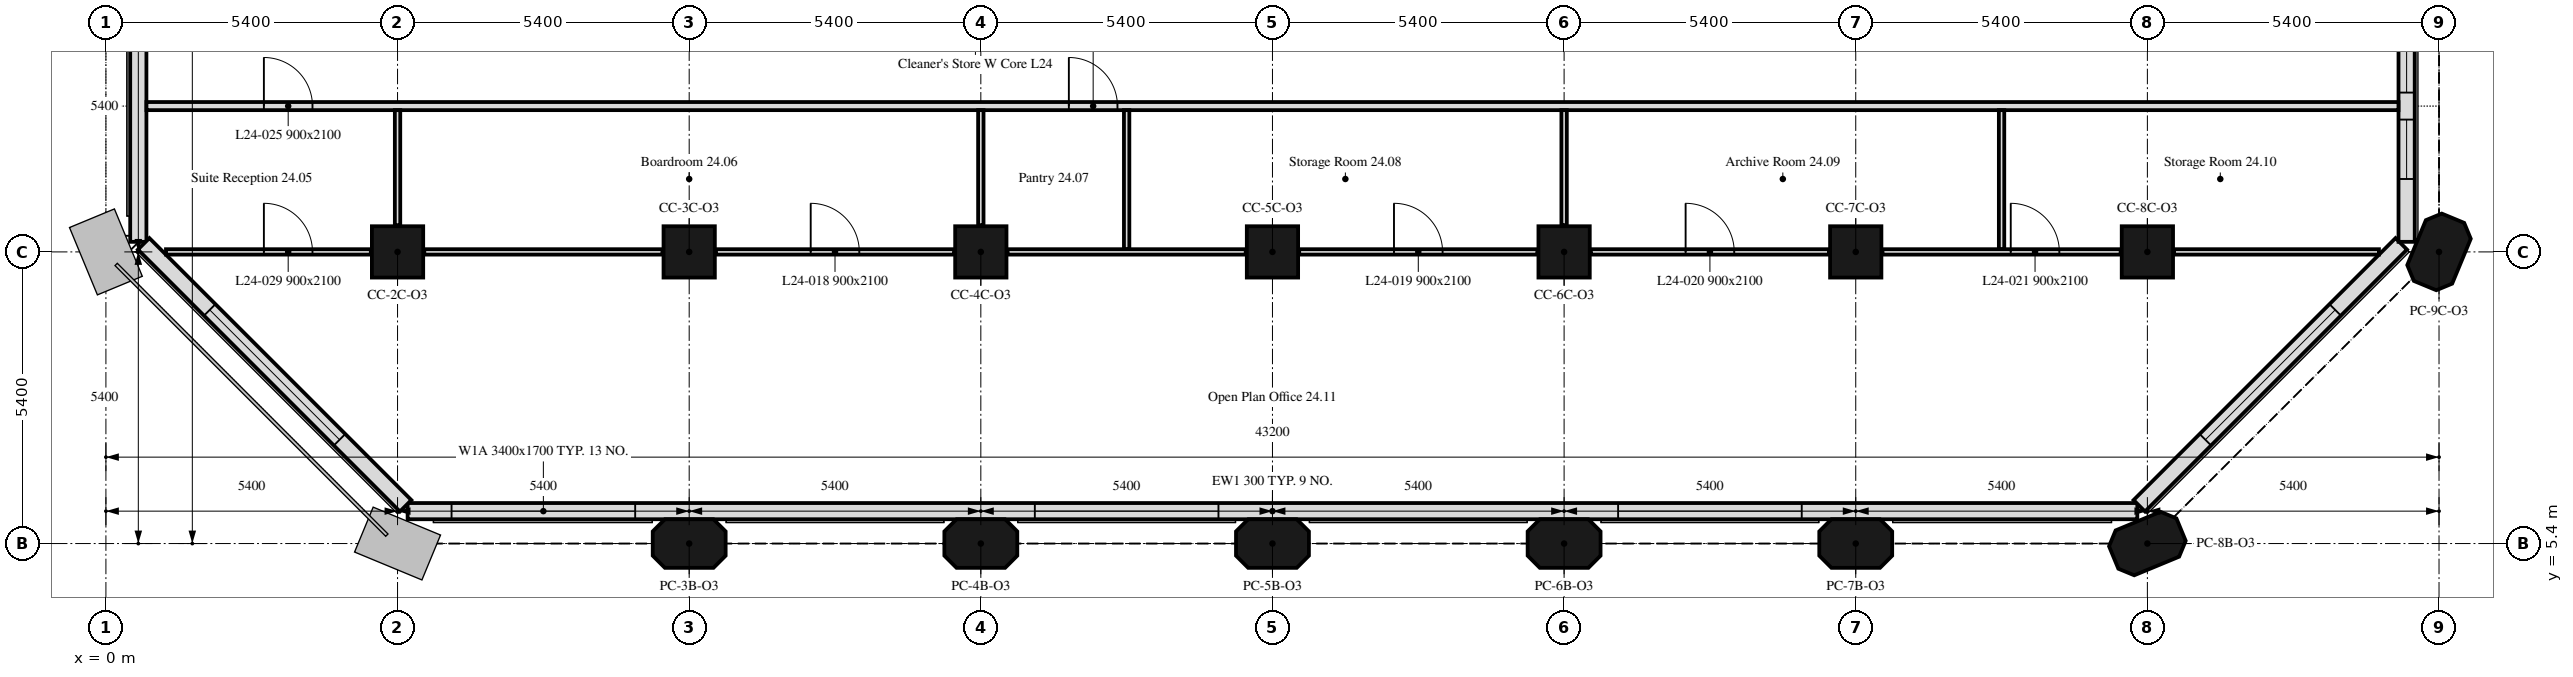
"""IFC4 building model, lengths in metres.
Left out: names, types, materials, properties, quantities, classifications, styles, units other than length and angle.
Written with IfcOpenShell. Run it as: python <this file> out.ifc"""

import sys

from ifc_helpers import new_model, si_unit, direction, frame, frame_2d, origin, origin_2d, place, context, subcontext, project, spatial, polyline, rectangle, outline, extrude, element, fill, save


model = new_model("IFC4")
c1 = context("Model", 3, precision=1e-05, world=origin(), true_north=direction((0.0, 1.0)))
c2 = subcontext(c1, "Body", "Model", "MODEL_VIEW")
j1 = project(units=[si_unit("LENGTHUNIT", "METRE"), si_unit("PLANEANGLEUNIT", "RADIAN")], contexts=[c1])
p1 = place(None, origin())
s1 = spatial("IfcSite", under=j1, at=p1, CompositionType="ELEMENT")
p2 = place(p1, origin())
s2 = spatial("IfcBuilding", under=s1, at=p2, CompositionType="ELEMENT")
p3 = place(p2, frame((0.0, 0.0, 103.0)))
s3 = spatial("IfcBuildingStorey", under=s2, at=p3, CompositionType="ELEMENT", Elevation=103.0)
for number, where, z_axis, x_axis in (
    (1, (10.8, 5.4, 0.0), (0.0, 0.0, 1.0), (1.0, 0.0, 0.0)),
    (2, (16.2, 5.4, 0.0), (0.0, 0.0, 1.0), (1.0, 0.0, 0.0)),
    (3, (21.6, 5.4, 0.0), (0.0, 0.0, 1.0), (1.0, 0.0, 0.0)),
    (4, (27.0, 5.4, 0.0), (0.0, 0.0, 1.0), (1.0, 0.0, 0.0)),
    (5, (32.4, 5.4, 0.0), (0.0, 0.0, 1.0), (1.0, 0.0, 0.0)),
    (6, (37.8, 5.4, 0.0), (0.0, 0.0, 1.0), (0.924, 0.383, 0.0)),
):
    element("IfcColumn", number, at=place(p3, frame(where, z_axis=z_axis, x_axis=x_axis)), inside=s3, PredefinedType="COLUMN", context=c2, shape_type="SweptSolid", body=[
        extrude(outline(polyline([(-0.45, -0.45), (0.45, -0.45), (0.675, -0.225), (0.675, 0.225), (0.45, 0.45), (-0.45, 0.45), (-0.675, 0.225), (-0.675, -0.225), (-0.45, -0.45)])), origin(), (0.0, 0.0, 1.0), 3.5),
    ])
for number, where, z_axis, x_axis in (
    (7, (5.4, 10.8, 0.0), (0.0, 0.0, 1.0), (1.0, 0.0, 0.0)),
    (8, (10.8, 10.8, 0.0), (0.0, 0.0, 1.0), (1.0, 0.0, 0.0)),
    (9, (16.2, 10.8, 0.0), (0.0, 0.0, 1.0), (1.0, 0.0, 0.0)),
    (10, (21.6, 10.8, 0.0), (0.0, 0.0, 1.0), (1.0, 0.0, 0.0)),
    (11, (27.0, 10.8, 0.0), (0.0, 0.0, 1.0), (1.0, 0.0, 0.0)),
    (12, (32.4, 10.8, 0.0), (0.0, 0.0, 1.0), (1.0, 0.0, 0.0)),
    (13, (37.8, 10.8, 0.0), (0.0, 0.0, 1.0), (1.0, 0.0, 0.0)),
):
    element("IfcColumn", number, at=place(p3, frame(where, z_axis=z_axis, x_axis=x_axis)), inside=s3, PredefinedType="COLUMN", context=c2, shape_type="SweptSolid", body=[
        extrude(rectangle(XDim=0.95, YDim=0.95, at=origin_2d()), origin(), (0.0, 0.0, 1.0), 3.5),
    ])
p4 = place(p3, frame((43.2, 10.8, 0.0), z_axis=(0.0, 0.0, 1.0), x_axis=(0.382683432365, 0.923879532511, 0.0)))
e14 = element("IfcColumn", 14, at=p4, inside=s3, PredefinedType="COLUMN", context=c2, shape_type="SweptSolid", body=[
    extrude(outline(polyline([(-0.45, -0.45), (0.45, -0.45), (0.675, -0.225), (0.675, 0.225), (0.45, 0.45), (-0.45, 0.45), (-0.675, 0.225), (-0.675, -0.225), (-0.45, -0.45)])), origin(), (0.0, 0.0, 1.0), 3.5),
])
p5 = place(p3, frame((5.586, 6.0, 0.0), z_axis=(0.0, 0.0, 1.0), x_axis=(1.0, 0.0, 0.0)))
e15 = element("IfcWall", 15, at=p5, inside=s3, PredefinedType="SOLIDWALL", context=c2, shape_type="SweptSolid", body=[
    extrude(rectangle(XDim=32.027, YDim=0.3, at=frame_2d((16.014, 0.0))), origin(), (0.0, 0.0, 1.0), 3.5),
])
p6 = place(p5, frame((0.814, 0.0, 0.9)))
e16 = element("IfcOpeningElement", 16, at=p6, cuts=e15, PredefinedType="OPENING", context=c2, shape_type="SweptSolid", body=[
    extrude(rectangle(XDim=3.4, YDim=1.7, at=frame_2d((1.7, 0.85))), frame((0.0, 0.16, 0.0), z_axis=(0.0, -1.0, 0.0), x_axis=(1.0, 0.0, 0.0)), (0.0, 0.0, 1.0), 0.32),
])
p7 = place(p5, frame((11.614, 0.0, 0.9)))
e17 = element("IfcOpeningElement", 17, at=p7, cuts=e15, PredefinedType="OPENING", context=c2, shape_type="SweptSolid", body=[
    extrude(rectangle(XDim=3.4, YDim=1.7, at=frame_2d((1.7, 0.85))), frame((0.0, 0.16, 0.0), z_axis=(0.0, -1.0, 0.0), x_axis=(1.0, 0.0, 0.0)), (0.0, 0.0, 1.0), 0.32),
])
p8 = place(p5, frame((22.414, 0.0, 0.9)))
e18 = element("IfcOpeningElement", 18, at=p8, cuts=e15, PredefinedType="OPENING", context=c2, shape_type="SweptSolid", body=[
    extrude(rectangle(XDim=3.4, YDim=1.7, at=frame_2d((1.7, 0.85))), frame((0.0, 0.16, 0.0), z_axis=(0.0, -1.0, 0.0), x_axis=(1.0, 0.0, 0.0)), (0.0, 0.0, 1.0), 0.32),
])
p9 = place(p3, frame((37.65, 6.099, 0.0), z_axis=(0.0, 0.0, 1.0), x_axis=(0.707106781187, 0.707106781187, 0.0)))
e19 = element("IfcWall", 19, at=p9, inside=s3, PredefinedType="SOLIDWALL", context=c2, shape_type="SweptSolid", body=[
    extrude(rectangle(XDim=6.86, YDim=0.3, at=frame_2d((3.43, 0.0))), origin(), (0.0, 0.0, 1.0), 3.5),
])
p10 = place(p9, frame((1.73, 0.0, 0.9)))
e20 = element("IfcOpeningElement", 20, at=p10, cuts=e19, PredefinedType="OPENING", context=c2, shape_type="SweptSolid", body=[
    extrude(rectangle(XDim=3.4, YDim=1.7, at=frame_2d((1.7, 0.85))), frame((0.0, 0.16, 0.0), z_axis=(0.0, -1.0, 0.0), x_axis=(1.0, 0.0, 0.0)), (0.0, 0.0, 1.0), 0.32),
])
p11 = place(p3, frame((42.6, 10.986, 0.0), z_axis=(0.0, 0.0, 1.0), x_axis=(0.0, 1.0, 0.0)))
e21 = element("IfcWall", 21, at=p11, inside=s3, PredefinedType="SOLIDWALL", context=c2, shape_type="SweptSolid", body=[
    extrude(rectangle(XDim=5.214, YDim=0.3, at=frame_2d((2.607, 0.0))), origin(), (0.0, 0.0, 1.0), 3.5),
])
p12 = place(p11, frame((1.164, 0.0, 0.9)))
e22 = element("IfcOpeningElement", 22, at=p12, cuts=e21, PredefinedType="OPENING", context=c2, shape_type="SweptSolid", body=[
    extrude(rectangle(XDim=1.1, YDim=1.7, at=frame_2d((0.55, 0.85))), frame((0.0, 0.16, 0.0), z_axis=(0.0, -1.0, 0.0), x_axis=(1.0, 0.0, 0.0)), (0.0, 0.0, 1.0), 0.32),
])
p13 = place(p11, frame((2.764, 0.0, 0.9)))
e23 = element("IfcOpeningElement", 23, at=p13, cuts=e21, PredefinedType="OPENING", context=c2, shape_type="SweptSolid", body=[
    extrude(rectangle(XDim=1.1, YDim=1.7, at=frame_2d((0.55, 0.85))), frame((0.0, 0.16, 0.0), z_axis=(0.0, -1.0, 0.0), x_axis=(1.0, 0.0, 0.0)), (0.0, 0.0, 1.0), 0.32),
])
p14 = place(p3, frame((0.6, 43.014, 0.0), z_axis=(0.0, 0.0, 1.0), x_axis=(0.0, -1.0, 0.0)))
e24 = element("IfcWall", 24, at=p14, inside=s3, PredefinedType="SOLIDWALL", context=c2, shape_type="SweptSolid", body=[
    extrude(rectangle(XDim=32.027, YDim=0.3, at=frame_2d((16.014, 0.0))), origin(), (0.0, 0.0, 1.0), 3.5),
])
p15 = place(p14, frame((0.814, 0.0, 0.9)))
e25 = element("IfcOpeningElement", 25, at=p15, cuts=e24, PredefinedType="OPENING", context=c2, shape_type="SweptSolid", body=[
    extrude(rectangle(XDim=3.4, YDim=1.7, at=frame_2d((1.7, 0.85))), frame((0.0, 0.16, 0.0), z_axis=(0.0, -1.0, 0.0), x_axis=(1.0, 0.0, 0.0)), (0.0, 0.0, 1.0), 0.32),
])
p16 = place(p14, frame((11.614, 0.0, 0.9)))
e26 = element("IfcOpeningElement", 26, at=p16, cuts=e24, PredefinedType="OPENING", context=c2, shape_type="SweptSolid", body=[
    extrude(rectangle(XDim=3.4, YDim=1.7, at=frame_2d((1.7, 0.85))), frame((0.0, 0.16, 0.0), z_axis=(0.0, -1.0, 0.0), x_axis=(1.0, 0.0, 0.0)), (0.0, 0.0, 1.0), 0.32),
])
p17 = place(p14, frame((22.414, 0.0, 0.9)))
e27 = element("IfcOpeningElement", 27, at=p17, cuts=e24, PredefinedType="OPENING", context=c2, shape_type="SweptSolid", body=[
    extrude(rectangle(XDim=3.4, YDim=1.7, at=frame_2d((1.7, 0.85))), frame((0.0, 0.16, 0.0), z_axis=(0.0, -1.0, 0.0), x_axis=(1.0, 0.0, 0.0)), (0.0, 0.0, 1.0), 0.32),
])
p18 = place(p3, frame((0.699, 10.949, 0.0), z_axis=(0.0, 0.0, 1.0), x_axis=(0.707106781187, -0.707106781187, 0.0)))
e28 = element("IfcWall", 28, at=p18, inside=s3, PredefinedType="SOLIDWALL", context=c2, shape_type="SweptSolid", body=[
    extrude(rectangle(XDim=6.86, YDim=0.3, at=frame_2d((3.43, 0.0))), origin(), (0.0, 0.0, 1.0), 3.5),
])
p19 = place(p18, frame((1.73, 0.0, 0.9)))
e29 = element("IfcOpeningElement", 29, at=p19, cuts=e28, PredefinedType="OPENING", context=c2, shape_type="SweptSolid", body=[
    extrude(rectangle(XDim=3.4, YDim=1.7, at=frame_2d((1.7, 0.85))), frame((0.0, 0.16, 0.0), z_axis=(0.0, -1.0, 0.0), x_axis=(1.0, 0.0, 0.0)), (0.0, 0.0, 1.0), 0.32),
])
p20 = place(p3, frame((0.751, 13.5, 0.0), z_axis=(0.0, 0.0, 1.0), x_axis=(1.0, 0.0, 0.0)))
e30 = element("IfcWall", 30, at=p20, inside=s3, PredefinedType="PARTITIONING", context=c2, shape_type="SweptSolid", body=[
    extrude(rectangle(XDim=41.698, YDim=0.15, at=frame_2d((20.849, 0.0))), origin(), (0.0, 0.0, 1.0), 3.5),
])
p21 = place(p20, frame((17.079, 0.0, 0.0)))
e31 = element("IfcOpeningElement", 31, at=p21, cuts=e30, PredefinedType="OPENING", context=c2, shape_type="SweptSolid", body=[
    extrude(rectangle(XDim=0.9, YDim=2.1, at=frame_2d((0.45, 1.05))), frame((0.0, 0.075, 0.0), z_axis=(0.0, -1.0, 0.0), x_axis=(1.0, 0.0, 0.0)), (0.0, 0.0, 1.0), 0.15),
])
p22 = place(p20, frame((2.174, 0.0, 0.0)))
e32 = element("IfcOpeningElement", 32, at=p22, cuts=e30, PredefinedType="OPENING", context=c2, shape_type="SweptSolid", body=[
    extrude(rectangle(XDim=0.9, YDim=2.1, at=frame_2d((0.45, 1.05))), frame((0.0, 0.075, 0.0), z_axis=(0.0, -1.0, 0.0), x_axis=(1.0, 0.0, 0.0)), (0.0, 0.0, 1.0), 0.15),
])
p23 = place(p3, frame((1.112, 10.8, 0.0), z_axis=(0.0, 0.0, 1.0), x_axis=(1.0, 0.0, 0.0)))
e33 = element("IfcWall", 33, at=p23, inside=s3, PredefinedType="PARTITIONING", context=c2, shape_type="SweptSolid", body=[
    extrude(rectangle(XDim=3.793, YDim=0.1, at=frame_2d((1.896, 0.0))), origin(), (0.0, 0.0, 1.0), 3.5),
])
p24 = place(p23, frame((1.813, 0.0, 0.0)))
e34 = element("IfcOpeningElement", 34, at=p24, cuts=e33, PredefinedType="OPENING", context=c2, shape_type="SweptSolid", body=[
    extrude(rectangle(XDim=0.9, YDim=2.1, at=frame_2d((0.45, 1.05))), frame((0.0, 0.05, 0.0), z_axis=(0.0, -1.0, 0.0), x_axis=(1.0, 0.0, 0.0)), (0.0, 0.0, 1.0), 0.1),
])
p25 = place(p3, frame((5.4, 11.295, 0.0), z_axis=(0.0, 0.0, 1.0), x_axis=(0.0, 1.0, 0.0)))
e35 = element("IfcWall", 35, at=p25, inside=s3, PredefinedType="PARTITIONING", context=c2, shape_type="SweptSolid", body=[
    extrude(rectangle(XDim=2.13, YDim=0.1, at=frame_2d((1.065, 0.0))), origin(), (0.0, 0.0, 1.0), 3.5),
])
p26 = place(p3, frame((5.895, 10.8, 0.0), z_axis=(0.0, 0.0, 1.0), x_axis=(1.0, 0.0, 0.0)))
e36 = element("IfcWall", 36, at=p26, inside=s3, PredefinedType="PARTITIONING", context=c2, shape_type="SweptSolid", body=[
    extrude(rectangle(XDim=4.41, YDim=0.1, at=frame_2d((2.205, 0.0))), origin(), (0.0, 0.0, 1.0), 3.5),
])
p27 = place(p3, frame((11.295, 10.8, 0.0), z_axis=(0.0, 0.0, 1.0), x_axis=(1.0, 0.0, 0.0)))
e37 = element("IfcWall", 37, at=p27, inside=s3, PredefinedType="PARTITIONING", context=c2, shape_type="SweptSolid", body=[
    extrude(rectangle(XDim=4.41, YDim=0.1, at=frame_2d((2.205, 0.0))), origin(), (0.0, 0.0, 1.0), 3.5),
])
p28 = place(p27, frame((1.755, 0.0, 0.0)))
e38 = element("IfcOpeningElement", 38, at=p28, cuts=e37, PredefinedType="OPENING", context=c2, shape_type="SweptSolid", body=[
    extrude(rectangle(XDim=0.9, YDim=2.1, at=frame_2d((0.45, 1.05))), frame((0.0, 0.05, 0.0), z_axis=(0.0, -1.0, 0.0), x_axis=(1.0, 0.0, 0.0)), (0.0, 0.0, 1.0), 0.1),
])
p29 = place(p3, frame((16.2, 11.295, 0.0), z_axis=(0.0, 0.0, 1.0), x_axis=(0.0, 1.0, 0.0)))
e39 = element("IfcWall", 39, at=p29, inside=s3, PredefinedType="PARTITIONING", context=c2, shape_type="SweptSolid", body=[
    extrude(rectangle(XDim=2.13, YDim=0.1, at=frame_2d((1.065, 0.0))), origin(), (0.0, 0.0, 1.0), 3.5),
])
p30 = place(p3, frame((18.9, 10.85, 0.0), z_axis=(0.0, 0.0, 1.0), x_axis=(0.0, 1.0, 0.0)))
e40 = element("IfcWall", 40, at=p30, inside=s3, PredefinedType="PARTITIONING", context=c2, shape_type="SweptSolid", body=[
    extrude(rectangle(XDim=2.575, YDim=0.1, at=frame_2d((1.288, 0.0))), origin(), (0.0, 0.0, 1.0), 3.5),
])
p31 = place(p3, frame((16.695, 10.8, 0.0), z_axis=(0.0, 0.0, 1.0), x_axis=(1.0, 0.0, 0.0)))
e41 = element("IfcWall", 41, at=p31, inside=s3, PredefinedType="PARTITIONING", context=c2, shape_type="SweptSolid", body=[
    extrude(rectangle(XDim=4.41, YDim=0.1, at=frame_2d((2.205, 0.0))), origin(), (0.0, 0.0, 1.0), 3.5),
])
p32 = place(p3, frame((22.095, 10.8, 0.0), z_axis=(0.0, 0.0, 1.0), x_axis=(1.0, 0.0, 0.0)))
e42 = element("IfcWall", 42, at=p32, inside=s3, PredefinedType="PARTITIONING", context=c2, shape_type="SweptSolid", body=[
    extrude(rectangle(XDim=4.41, YDim=0.1, at=frame_2d((2.205, 0.0))), origin(), (0.0, 0.0, 1.0), 3.5),
])
p33 = place(p32, frame((1.755, 0.0, 0.0)))
e43 = element("IfcOpeningElement", 43, at=p33, cuts=e42, PredefinedType="OPENING", context=c2, shape_type="SweptSolid", body=[
    extrude(rectangle(XDim=0.9, YDim=2.1, at=frame_2d((0.45, 1.05))), frame((0.0, 0.05, 0.0), z_axis=(0.0, -1.0, 0.0), x_axis=(1.0, 0.0, 0.0)), (0.0, 0.0, 1.0), 0.1),
])
p34 = place(p3, frame((27.0, 11.295, 0.0), z_axis=(0.0, 0.0, 1.0), x_axis=(0.0, 1.0, 0.0)))
e44 = element("IfcWall", 44, at=p34, inside=s3, PredefinedType="PARTITIONING", context=c2, shape_type="SweptSolid", body=[
    extrude(rectangle(XDim=2.13, YDim=0.1, at=frame_2d((1.065, 0.0))), origin(), (0.0, 0.0, 1.0), 3.5),
])
p35 = place(p3, frame((27.495, 10.8, 0.0), z_axis=(0.0, 0.0, 1.0), x_axis=(1.0, 0.0, 0.0)))
e45 = element("IfcWall", 45, at=p35, inside=s3, PredefinedType="PARTITIONING", context=c2, shape_type="SweptSolid", body=[
    extrude(rectangle(XDim=4.41, YDim=0.1, at=frame_2d((2.205, 0.0))), origin(), (0.0, 0.0, 1.0), 3.5),
])
p36 = place(p35, frame((1.755, 0.0, 0.0)))
e46 = element("IfcOpeningElement", 46, at=p36, cuts=e45, PredefinedType="OPENING", context=c2, shape_type="SweptSolid", body=[
    extrude(rectangle(XDim=0.9, YDim=2.1, at=frame_2d((0.45, 1.05))), frame((0.0, 0.05, 0.0), z_axis=(0.0, -1.0, 0.0), x_axis=(1.0, 0.0, 0.0)), (0.0, 0.0, 1.0), 0.1),
])
p37 = place(p3, frame((35.1, 10.85, 0.0), z_axis=(0.0, 0.0, 1.0), x_axis=(0.0, 1.0, 0.0)))
e47 = element("IfcWall", 47, at=p37, inside=s3, PredefinedType="PARTITIONING", context=c2, shape_type="SweptSolid", body=[
    extrude(rectangle(XDim=2.575, YDim=0.1, at=frame_2d((1.288, 0.0))), origin(), (0.0, 0.0, 1.0), 3.5),
])
p38 = place(p3, frame((32.895, 10.8, 0.0), z_axis=(0.0, 0.0, 1.0), x_axis=(1.0, 0.0, 0.0)))
e48 = element("IfcWall", 48, at=p38, inside=s3, PredefinedType="PARTITIONING", context=c2, shape_type="SweptSolid", body=[
    extrude(rectangle(XDim=4.41, YDim=0.1, at=frame_2d((2.205, 0.0))), origin(), (0.0, 0.0, 1.0), 3.5),
])
p39 = place(p38, frame((2.375, 0.0, 0.0)))
e49 = element("IfcOpeningElement", 49, at=p39, cuts=e48, PredefinedType="OPENING", context=c2, shape_type="SweptSolid", body=[
    extrude(rectangle(XDim=0.9, YDim=2.1, at=frame_2d((0.45, 1.05))), frame((0.0, 0.05, 0.0), z_axis=(0.0, -1.0, 0.0), x_axis=(1.0, 0.0, 0.0)), (0.0, 0.0, 1.0), 0.1),
])
p40 = place(p3, frame((38.295, 10.8, 0.0), z_axis=(0.0, 0.0, 1.0), x_axis=(1.0, 0.0, 0.0)))
e50 = element("IfcWall", 50, at=p40, inside=s3, PredefinedType="PARTITIONING", context=c2, shape_type="SweptSolid", body=[
    extrude(rectangle(XDim=3.793, YDim=0.1, at=frame_2d((1.896, 0.0))), origin(), (0.0, 0.0, 1.0), 3.5),
])
p41 = place(p6, origin())
e51 = element("IfcWindow", 51, at=p41, inside=s3, PartitioningType="SINGLE_PANEL", PredefinedType="WINDOW", context=c2, shape_type="SweptSolid", body=[
    extrude(rectangle(XDim=3.4, YDim=1.7, at=frame_2d((1.7, 0.85))), frame((0.0, 0.03, 0.0), z_axis=(0.0, -1.0, 0.0), x_axis=(1.0, 0.0, 0.0)), (0.0, 0.0, 1.0), 0.06),
])
fill(e16, e51)
p42 = place(p7, origin())
e52 = element("IfcWindow", 52, at=p42, inside=s3, PartitioningType="SINGLE_PANEL", PredefinedType="WINDOW", context=c2, shape_type="SweptSolid", body=[
    extrude(rectangle(XDim=3.4, YDim=1.7, at=frame_2d((1.7, 0.85))), frame((0.0, 0.03, 0.0), z_axis=(0.0, -1.0, 0.0), x_axis=(1.0, 0.0, 0.0)), (0.0, 0.0, 1.0), 0.06),
])
fill(e17, e52)
p43 = place(p8, origin())
e53 = element("IfcWindow", 53, at=p43, inside=s3, PartitioningType="SINGLE_PANEL", PredefinedType="WINDOW", context=c2, shape_type="SweptSolid", body=[
    extrude(rectangle(XDim=3.4, YDim=1.7, at=frame_2d((1.7, 0.85))), frame((0.0, 0.03, 0.0), z_axis=(0.0, -1.0, 0.0), x_axis=(1.0, 0.0, 0.0)), (0.0, 0.0, 1.0), 0.06),
])
fill(e18, e53)
p44 = place(p10, origin())
e54 = element("IfcWindow", 54, at=p44, inside=s3, PartitioningType="SINGLE_PANEL", PredefinedType="WINDOW", context=c2, shape_type="SweptSolid", body=[
    extrude(rectangle(XDim=3.4, YDim=1.7, at=frame_2d((1.7, 0.85))), frame((0.0, 0.03, 0.0), z_axis=(0.0, -1.0, 0.0), x_axis=(1.0, 0.0, 0.0)), (0.0, 0.0, 1.0), 0.06),
])
fill(e20, e54)
p45 = place(p12, origin())
e55 = element("IfcWindow", 55, at=p45, inside=s3, PartitioningType="SINGLE_PANEL", PredefinedType="WINDOW", context=c2, shape_type="SweptSolid", body=[
    extrude(rectangle(XDim=1.1, YDim=1.7, at=frame_2d((0.55, 0.85))), frame((0.0, 0.03, 0.0), z_axis=(0.0, -1.0, 0.0), x_axis=(1.0, 0.0, 0.0)), (0.0, 0.0, 1.0), 0.06),
])
fill(e22, e55)
p46 = place(p13, origin())
e56 = element("IfcWindow", 56, at=p46, inside=s3, PartitioningType="SINGLE_PANEL", PredefinedType="WINDOW", context=c2, shape_type="SweptSolid", body=[
    extrude(rectangle(XDim=1.1, YDim=1.7, at=frame_2d((0.55, 0.85))), frame((0.0, 0.03, 0.0), z_axis=(0.0, -1.0, 0.0), x_axis=(1.0, 0.0, 0.0)), (0.0, 0.0, 1.0), 0.06),
])
fill(e23, e56)
p47 = place(p19, origin())
e57 = element("IfcWindow", 57, at=p47, inside=s3, PartitioningType="SINGLE_PANEL", PredefinedType="WINDOW", context=c2, shape_type="SweptSolid", body=[
    extrude(rectangle(XDim=3.4, YDim=1.7, at=frame_2d((1.7, 0.85))), frame((0.0, 0.03, 0.0), z_axis=(0.0, -1.0, 0.0), x_axis=(1.0, 0.0, 0.0)), (0.0, 0.0, 1.0), 0.06),
])
fill(e29, e57)
p48 = place(p21, origin())
e58 = element("IfcDoor", 58, at=p48, inside=s3, OperationType="SINGLE_SWING_RIGHT", PredefinedType="DOOR", context=c2, shape_type="SweptSolid", body=[
    extrude(rectangle(XDim=0.9, YDim=2.1, at=frame_2d((0.45, 1.05))), frame((0.0, 0.025, 0.0), z_axis=(0.0, -1.0, 0.0), x_axis=(1.0, 0.0, 0.0)), (0.0, 0.0, 1.0), 0.05),
])
fill(e31, e58)
p49 = place(p28, origin())
e59 = element("IfcDoor", 59, at=p49, inside=s3, OperationType="SINGLE_SWING_LEFT", PredefinedType="DOOR", context=c2, shape_type="SweptSolid", body=[
    extrude(rectangle(XDim=0.9, YDim=2.1, at=frame_2d((0.45, 1.05))), frame((0.0, 0.025, 0.0), z_axis=(0.0, -1.0, 0.0), x_axis=(1.0, 0.0, 0.0)), (0.0, 0.0, 1.0), 0.05),
])
fill(e38, e59)
p50 = place(p33, origin())
e60 = element("IfcDoor", 60, at=p50, inside=s3, OperationType="SINGLE_SWING_RIGHT", PredefinedType="DOOR", context=c2, shape_type="SweptSolid", body=[
    extrude(rectangle(XDim=0.9, YDim=2.1, at=frame_2d((0.45, 1.05))), frame((0.0, 0.025, 0.0), z_axis=(0.0, -1.0, 0.0), x_axis=(1.0, 0.0, 0.0)), (0.0, 0.0, 1.0), 0.05),
])
fill(e43, e60)
p51 = place(p36, origin())
e61 = element("IfcDoor", 61, at=p51, inside=s3, OperationType="SINGLE_SWING_LEFT", PredefinedType="DOOR", context=c2, shape_type="SweptSolid", body=[
    extrude(rectangle(XDim=0.9, YDim=2.1, at=frame_2d((0.45, 1.05))), frame((0.0, 0.025, 0.0), z_axis=(0.0, -1.0, 0.0), x_axis=(1.0, 0.0, 0.0)), (0.0, 0.0, 1.0), 0.05),
])
fill(e46, e61)
p52 = place(p39, origin())
e62 = element("IfcDoor", 62, at=p52, inside=s3, OperationType="SINGLE_SWING_RIGHT", PredefinedType="DOOR", context=c2, shape_type="SweptSolid", body=[
    extrude(rectangle(XDim=0.9, YDim=2.1, at=frame_2d((0.45, 1.05))), frame((0.0, 0.025, 0.0), z_axis=(0.0, -1.0, 0.0), x_axis=(1.0, 0.0, 0.0)), (0.0, 0.0, 1.0), 0.05),
])
fill(e49, e62)
p53 = place(p22, origin())
e63 = element("IfcDoor", 63, at=p53, inside=s3, OperationType="SINGLE_SWING_RIGHT", PredefinedType="DOOR", context=c2, shape_type="SweptSolid", body=[
    extrude(rectangle(XDim=0.9, YDim=2.1, at=frame_2d((0.45, 1.05))), frame((0.0, 0.025, 0.0), z_axis=(0.0, -1.0, 0.0), x_axis=(1.0, 0.0, 0.0)), (0.0, 0.0, 1.0), 0.05),
])
fill(e32, e63)
p54 = place(p24, origin())
e64 = element("IfcDoor", 64, at=p54, inside=s3, OperationType="SINGLE_SWING_RIGHT", PredefinedType="DOOR", context=c2, shape_type="SweptSolid", body=[
    extrude(rectangle(XDim=0.9, YDim=2.1, at=frame_2d((0.45, 1.05))), frame((0.0, 0.025, 0.0), z_axis=(0.0, -1.0, 0.0), x_axis=(1.0, 0.0, 0.0)), (0.0, 0.0, 1.0), 0.05),
])
fill(e34, e64)
save(model, sys.argv[1])
